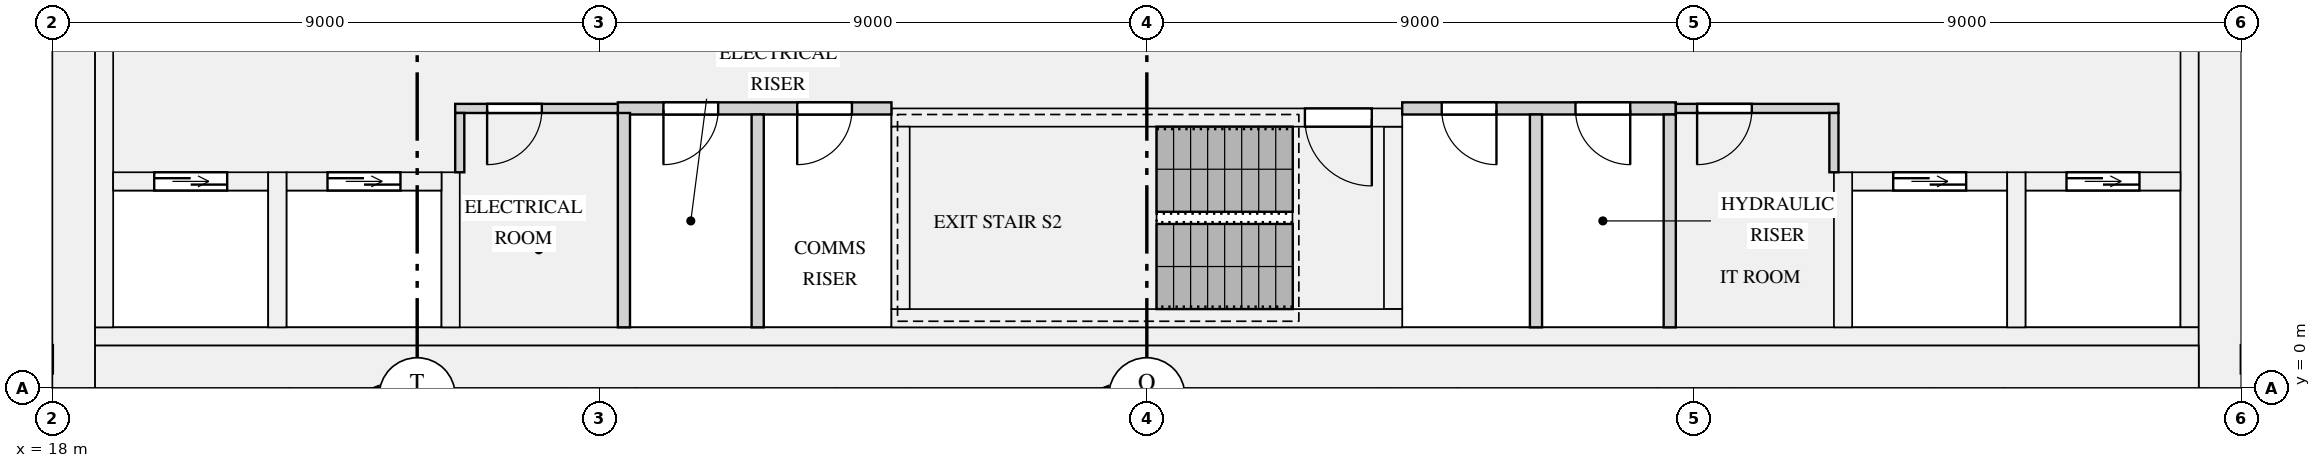
"""IFC4 building model, lengths in metres.
Left out: names, types, materials, properties, quantities, classifications, styles, units other than length and angle.
Written with IfcOpenShell. Run it as: python <this file> out.ifc"""

import sys

from ifc_helpers import new_model, si_unit, direction, frame, frame_2d, origin, place, context, subcontext, project, spatial, rectangle, extrude, element, fill, save


model = new_model("IFC4")
c1 = context("Model", 3, precision=1e-05, world=origin(), true_north=direction((0.0, 1.0)))
c2 = subcontext(c1, "Body", "Model", "MODEL_VIEW")
j1 = project(units=[si_unit("LENGTHUNIT", "METRE"), si_unit("PLANEANGLEUNIT", "RADIAN")], contexts=[c1])
p1 = place(None, origin())
s1 = spatial("IfcSite", under=j1, at=p1, CompositionType="ELEMENT")
p2 = place(p1, origin())
s2 = spatial("IfcBuilding", under=s1, at=p2, CompositionType="ELEMENT")
p3 = place(p2, frame((0.0, 0.0, 182.25)))
s3 = spatial("IfcBuildingStorey", under=s2, at=p3, CompositionType="ELEMENT", Elevation=182.25)
for number, where, z_axis, x_axis in (
    (1, (18.35, 0.0, 0.0), (0.0, 0.0, 1.0), (0.0, 1.0, 0.0)),
    (2, (53.65, 0.0, 0.0), (0.0, 0.0, 1.0), (0.0, 1.0, 0.0)),
):
    element("IfcWall", number, at=place(p3, frame(where, z_axis=z_axis, x_axis=x_axis)), inside=s3, PredefinedType="SHEAR", context=c2, shape_type="SweptSolid", body=[
        extrude(rectangle(XDim=12.5, YDim=0.7, at=frame_2d((6.25, 0.0))), origin(), (0.0, 0.0, 1.0), 3.15),
    ])
p4 = place(p3, frame((18.7, 0.35, 0.0), z_axis=(0.0, 0.0, 1.0), x_axis=(1.0, 0.0, 0.0)))
e3 = element("IfcWall", 3, at=p4, inside=s3, PredefinedType="SHEAR", context=c2, shape_type="SweptSolid", body=[
    extrude(rectangle(XDim=34.6, YDim=0.7, at=frame_2d((17.3, 0.0))), origin(), (0.0, 0.0, 1.0), 3.15),
])
for number, where, z_axis, x_axis in (
    (4, (18.85, 1.0, 0.0), (0.0, 0.0, 1.0), (0.0, 1.0, 0.0)),
    (5, (53.15, 1.0, 0.0), (0.0, 0.0, 1.0), (0.0, 1.0, 0.0)),
):
    element("IfcWall", number, at=place(p3, frame(where, z_axis=z_axis, x_axis=x_axis)), inside=s3, PredefinedType="SHEAR", context=c2, shape_type="SweptSolid", body=[
        extrude(rectangle(XDim=10.9, YDim=0.3, at=frame_2d((5.45, 0.0))), origin(), (0.0, 0.0, 1.0), 3.15),
    ])
p5 = place(p3, frame((18.7, 0.85, 0.0), z_axis=(0.0, 0.0, 1.0), x_axis=(1.0, 0.0, 0.0)))
e6 = element("IfcWall", 6, at=p5, inside=s3, PredefinedType="SHEAR", context=c2, shape_type="SweptSolid", body=[
    extrude(rectangle(XDim=34.6, YDim=0.3, at=frame_2d((17.3, 0.0))), origin(), (0.0, 0.0, 1.0), 3.15),
])
p6 = place(p3, frame((19.0, 3.4, 0.0), z_axis=(0.0, 0.0, 1.0), x_axis=(1.0, 0.0, 0.0)))
e7 = element("IfcWall", 7, at=p6, inside=s3, PredefinedType="SHEAR", context=c2, shape_type="SweptSolid", body=[
    extrude(rectangle(XDim=2.55, YDim=0.3, at=frame_2d((1.275, 0.0))), origin(), (0.0, 0.0, 1.0), 3.15),
])
p7 = place(p6, frame((0.675, 0.0, 0.0)))
e8 = element("IfcOpeningElement", 8, at=p7, cuts=e7, PredefinedType="OPENING", context=c2, shape_type="SweptSolid", body=[
    extrude(rectangle(XDim=1.2, YDim=2.1, at=frame_2d((0.6, 1.05))), frame((0.0, 0.16, 0.0), z_axis=(0.0, -1.0, 0.0), x_axis=(1.0, 0.0, 0.0)), (0.0, 0.0, 1.0), 0.32),
])
p8 = place(p3, frame((21.85, 3.4, 0.0), z_axis=(0.0, 0.0, 1.0), x_axis=(1.0, 0.0, 0.0)))
e9 = element("IfcWall", 9, at=p8, inside=s3, PredefinedType="SHEAR", context=c2, shape_type="SweptSolid", body=[
    extrude(rectangle(XDim=2.55, YDim=0.3, at=frame_2d((1.275, 0.0))), origin(), (0.0, 0.0, 1.0), 3.15),
])
p9 = place(p8, frame((0.675, 0.0, 0.0)))
e10 = element("IfcOpeningElement", 10, at=p9, cuts=e9, PredefinedType="OPENING", context=c2, shape_type="SweptSolid", body=[
    extrude(rectangle(XDim=1.2, YDim=2.1, at=frame_2d((0.6, 1.05))), frame((0.0, 0.16, 0.0), z_axis=(0.0, -1.0, 0.0), x_axis=(1.0, 0.0, 0.0)), (0.0, 0.0, 1.0), 0.32),
])
for number, where, z_axis, x_axis in (
    (11, (21.7, 1.0, 0.0), (0.0, 0.0, 1.0), (0.0, 1.0, 0.0)),
    (12, (24.55, 1.0, 0.0), (0.0, 0.0, 1.0), (0.0, 1.0, 0.0)),
):
    element("IfcWall", number, at=place(p3, frame(where, z_axis=z_axis, x_axis=x_axis)), inside=s3, PredefinedType="SHEAR", context=c2, shape_type="SweptSolid", body=[
        extrude(rectangle(XDim=2.55, YDim=0.3, at=frame_2d((1.275, 0.0))), origin(), (0.0, 0.0, 1.0), 3.15),
    ])
p10 = place(p3, frame((47.6, 3.4, 0.0), z_axis=(0.0, 0.0, 1.0), x_axis=(1.0, 0.0, 0.0)))
e13 = element("IfcWall", 13, at=p10, inside=s3, PredefinedType="SHEAR", context=c2, shape_type="SweptSolid", body=[
    extrude(rectangle(XDim=2.55, YDim=0.3, at=frame_2d((1.275, 0.0))), origin(), (0.0, 0.0, 1.0), 3.15),
])
p11 = place(p10, frame((0.675, 0.0, 0.0)))
e14 = element("IfcOpeningElement", 14, at=p11, cuts=e13, PredefinedType="OPENING", context=c2, shape_type="SweptSolid", body=[
    extrude(rectangle(XDim=1.2, YDim=2.1, at=frame_2d((0.6, 1.05))), frame((0.0, 0.16, 0.0), z_axis=(0.0, -1.0, 0.0), x_axis=(1.0, 0.0, 0.0)), (0.0, 0.0, 1.0), 0.32),
])
p12 = place(p3, frame((47.45, 1.0, 0.0), z_axis=(0.0, 0.0, 1.0), x_axis=(0.0, 1.0, 0.0)))
e15 = element("IfcWall", 15, at=p12, inside=s3, PredefinedType="SHEAR", context=c2, shape_type="SweptSolid", body=[
    extrude(rectangle(XDim=2.55, YDim=0.3, at=frame_2d((1.275, 0.0))), origin(), (0.0, 0.0, 1.0), 3.15),
])
p13 = place(p3, frame((50.45, 3.4, 0.0), z_axis=(0.0, 0.0, 1.0), x_axis=(1.0, 0.0, 0.0)))
e16 = element("IfcWall", 16, at=p13, inside=s3, PredefinedType="SHEAR", context=c2, shape_type="SweptSolid", body=[
    extrude(rectangle(XDim=2.55, YDim=0.3, at=frame_2d((1.275, 0.0))), origin(), (0.0, 0.0, 1.0), 3.15),
])
p14 = place(p13, frame((0.675, 0.0, 0.0)))
e17 = element("IfcOpeningElement", 17, at=p14, cuts=e16, PredefinedType="OPENING", context=c2, shape_type="SweptSolid", body=[
    extrude(rectangle(XDim=1.2, YDim=2.1, at=frame_2d((0.6, 1.05))), frame((0.0, 0.16, 0.0), z_axis=(0.0, -1.0, 0.0), x_axis=(1.0, 0.0, 0.0)), (0.0, 0.0, 1.0), 0.32),
])
p15 = place(p3, frame((50.3, 1.0, 0.0), z_axis=(0.0, 0.0, 1.0), x_axis=(0.0, 1.0, 0.0)))
e18 = element("IfcWall", 18, at=p15, inside=s3, PredefinedType="SHEAR", context=c2, shape_type="SweptSolid", body=[
    extrude(rectangle(XDim=2.55, YDim=0.3, at=frame_2d((1.275, 0.0))), origin(), (0.0, 0.0, 1.0), 3.15),
])
p16 = place(p3, frame((31.8, 1.15, 0.0), z_axis=(0.0, 0.0, 1.0), x_axis=(1.0, 0.0, 0.0)))
e19 = element("IfcWall", 19, at=p16, inside=s3, PredefinedType="SHEAR", context=c2, shape_type="SweptSolid", body=[
    extrude(rectangle(XDim=8.4, YDim=0.3, at=frame_2d((4.2, 0.0))), origin(), (0.0, 0.0, 1.0), 3.15),
])
p17 = place(p3, frame((31.8, 4.45, 0.0), z_axis=(0.0, 0.0, 1.0), x_axis=(1.0, 0.0, 0.0)))
e20 = element("IfcWall", 20, at=p17, inside=s3, PredefinedType="SHEAR", context=c2, shape_type="SweptSolid", body=[
    extrude(rectangle(XDim=8.4, YDim=0.3, at=frame_2d((4.2, 0.0))), origin(), (0.0, 0.0, 1.0), 3.15),
])
p18 = place(p17, frame((6.8, 0.0, 0.0)))
e21 = element("IfcOpeningElement", 21, at=p18, cuts=e20, PredefinedType="OPENING", context=c2, shape_type="SweptSolid", body=[
    extrude(rectangle(XDim=1.1, YDim=2.1, at=frame_2d((0.55, 1.05))), frame((0.0, 0.16, 0.0), z_axis=(0.0, -1.0, 0.0), x_axis=(1.0, 0.0, 0.0)), (0.0, 0.0, 1.0), 0.32),
])
for number, where, z_axis, x_axis in (
    (22, (31.95, 1.3, 0.0), (0.0, 0.0, 1.0), (0.0, 1.0, 0.0)),
    (23, (40.05, 1.3, 0.0), (0.0, 0.0, 1.0), (0.0, 1.0, 0.0)),
):
    element("IfcWall", number, at=place(p3, frame(where, z_axis=z_axis, x_axis=x_axis)), inside=s3, PredefinedType="SHEAR", context=c2, shape_type="SweptSolid", body=[
        extrude(rectangle(XDim=3.0, YDim=0.3, at=frame_2d((1.5, 0.0))), origin(), (0.0, 0.0, 1.0), 3.15),
    ])
p19 = place(p3, frame((27.3, 4.6, 0.0), z_axis=(0.0, 0.0, 1.0), x_axis=(1.0, 0.0, 0.0)))
e24 = element("IfcWall", 24, at=p19, inside=s3, PredefinedType="PARTITIONING", context=c2, shape_type="SweptSolid", body=[
    extrude(rectangle(XDim=4.5, YDim=0.2, at=frame_2d((2.25, 0.0))), origin(), (0.0, 0.0, 1.0), 2.65),
])
p20 = place(p19, frame((0.75, 0.0, 0.0)))
e25 = element("IfcOpeningElement", 25, at=p20, cuts=e24, PredefinedType="OPENING", context=c2, shape_type="SweptSolid", body=[
    extrude(rectangle(XDim=0.9, YDim=2.1, at=frame_2d((0.45, 1.05))), frame((0.0, 0.11, 0.0), z_axis=(0.0, -1.0, 0.0), x_axis=(1.0, 0.0, 0.0)), (0.0, 0.0, 1.0), 0.22),
])
p21 = place(p19, frame((2.95, 0.0, 0.0)))
e26 = element("IfcOpeningElement", 26, at=p21, cuts=e24, PredefinedType="OPENING", context=c2, shape_type="SweptSolid", body=[
    extrude(rectangle(XDim=0.9, YDim=2.1, at=frame_2d((0.45, 1.05))), frame((0.0, 0.11, 0.0), z_axis=(0.0, -1.0, 0.0), x_axis=(1.0, 0.0, 0.0)), (0.0, 0.0, 1.0), 0.22),
])
p22 = place(p3, frame((40.2, 4.6, 0.0), z_axis=(0.0, 0.0, 1.0), x_axis=(1.0, 0.0, 0.0)))
e27 = element("IfcWall", 27, at=p22, inside=s3, PredefinedType="PARTITIONING", context=c2, shape_type="SweptSolid", body=[
    extrude(rectangle(XDim=4.5, YDim=0.2, at=frame_2d((2.25, 0.0))), origin(), (0.0, 0.0, 1.0), 2.65),
])
p23 = place(p22, frame((0.65, 0.0, 0.0)))
e28 = element("IfcOpeningElement", 28, at=p23, cuts=e27, PredefinedType="OPENING", context=c2, shape_type="SweptSolid", body=[
    extrude(rectangle(XDim=0.9, YDim=2.1, at=frame_2d((0.45, 1.05))), frame((0.0, 0.11, 0.0), z_axis=(0.0, -1.0, 0.0), x_axis=(1.0, 0.0, 0.0)), (0.0, 0.0, 1.0), 0.22),
])
p24 = place(p22, frame((2.85, 0.0, 0.0)))
e29 = element("IfcOpeningElement", 29, at=p24, cuts=e27, PredefinedType="OPENING", context=c2, shape_type="SweptSolid", body=[
    extrude(rectangle(XDim=0.9, YDim=2.1, at=frame_2d((0.45, 1.05))), frame((0.0, 0.11, 0.0), z_axis=(0.0, -1.0, 0.0), x_axis=(1.0, 0.0, 0.0)), (0.0, 0.0, 1.0), 0.22),
])
p25 = place(p3, frame((24.625, 4.6, 0.0), z_axis=(0.0, 0.0, 1.0), x_axis=(1.0, 0.0, 0.0)))
e30 = element("IfcWall", 30, at=p25, inside=s3, PredefinedType="PARTITIONING", context=c2, shape_type="SweptSolid", body=[
    extrude(rectangle(XDim=2.675, YDim=0.15, at=frame_2d((1.337, 0.0))), origin(), (0.0, 0.0, 1.0), 2.65),
])
p26 = place(p25, frame((0.525, 0.0, 0.0)))
e31 = element("IfcOpeningElement", 31, at=p26, cuts=e30, PredefinedType="OPENING", context=c2, shape_type="SweptSolid", body=[
    extrude(rectangle(XDim=0.9, YDim=2.1, at=frame_2d((0.45, 1.05))), frame((0.0, 0.085, 0.0), z_axis=(0.0, -1.0, 0.0), x_axis=(1.0, 0.0, 0.0)), (0.0, 0.0, 1.0), 0.17),
])
p27 = place(p3, frame((44.7, 4.6, 0.0), z_axis=(0.0, 0.0, 1.0), x_axis=(1.0, 0.0, 0.0)))
e32 = element("IfcWall", 32, at=p27, inside=s3, PredefinedType="PARTITIONING", context=c2, shape_type="SweptSolid", body=[
    extrude(rectangle(XDim=2.675, YDim=0.15, at=frame_2d((1.337, 0.0))), origin(), (0.0, 0.0, 1.0), 2.65),
])
p28 = place(p27, frame((0.35, 0.0, 0.0)))
e33 = element("IfcOpeningElement", 33, at=p28, cuts=e32, PredefinedType="OPENING", context=c2, shape_type="SweptSolid", body=[
    extrude(rectangle(XDim=0.9, YDim=2.1, at=frame_2d((0.45, 1.05))), frame((0.0, 0.085, 0.0), z_axis=(0.0, -1.0, 0.0), x_axis=(1.0, 0.0, 0.0)), (0.0, 0.0, 1.0), 0.17),
])
p29 = place(p3, frame((27.4, 1.0, 0.0), z_axis=(0.0, 0.0, 1.0), x_axis=(0.0, 1.0, 0.0)))
e34 = element("IfcWall", 34, at=p29, inside=s3, PredefinedType="PARTITIONING", context=c2, shape_type="SweptSolid", body=[
    extrude(rectangle(XDim=3.525, YDim=0.2, at=frame_2d((1.762, 0.0))), origin(), (0.0, 0.0, 1.0), 2.65),
])
for number, where, z_axis, x_axis in (
    (35, (29.6, 1.0, 0.0), (0.0, 0.0, 1.0), (0.0, 1.0, 0.0)),
    (36, (42.4, 1.0, 0.0), (0.0, 0.0, 1.0), (0.0, 1.0, 0.0)),
    (37, (44.6, 1.0, 0.0), (0.0, 0.0, 1.0), (0.0, 1.0, 0.0)),
):
    element("IfcWall", number, at=place(p3, frame(where, z_axis=z_axis, x_axis=x_axis)), inside=s3, PredefinedType="PARTITIONING", context=c2, shape_type="SweptSolid", body=[
        extrude(rectangle(XDim=3.5, YDim=0.2, at=frame_2d((1.75, 0.0))), origin(), (0.0, 0.0, 1.0), 2.65),
    ])
for number, where, z_axis, x_axis in (
    (38, (24.7, 3.55, 0.0), (0.0, 0.0, 1.0), (0.0, 1.0, 0.0)),
    (39, (47.3, 3.55, 0.0), (0.0, 0.0, 1.0), (0.0, 1.0, 0.0)),
):
    element("IfcWall", number, at=place(p3, frame(where, z_axis=z_axis, x_axis=x_axis)), inside=s3, PredefinedType="PARTITIONING", context=c2, shape_type="SweptSolid", body=[
        extrude(rectangle(XDim=0.975, YDim=0.15, at=frame_2d((0.487, 0.0))), origin(), (0.0, 0.0, 1.0), 2.65),
    ])
p30 = place(p7, origin())
e40 = element("IfcDoor", 40, at=p30, inside=s3, OperationType="DOUBLE_DOOR_SLIDING", PredefinedType="DOOR", context=c2, shape_type="SweptSolid", body=[
    extrude(rectangle(XDim=1.2, YDim=2.1, at=frame_2d((0.6, 1.05))), frame((0.0, 0.025, 0.0), z_axis=(0.0, -1.0, 0.0), x_axis=(1.0, 0.0, 0.0)), (0.0, 0.0, 1.0), 0.05),
])
fill(e8, e40)
p31 = place(p9, origin())
e41 = element("IfcDoor", 41, at=p31, inside=s3, OperationType="DOUBLE_DOOR_SLIDING", PredefinedType="DOOR", context=c2, shape_type="SweptSolid", body=[
    extrude(rectangle(XDim=1.2, YDim=2.1, at=frame_2d((0.6, 1.05))), frame((0.0, 0.025, 0.0), z_axis=(0.0, -1.0, 0.0), x_axis=(1.0, 0.0, 0.0)), (0.0, 0.0, 1.0), 0.05),
])
fill(e10, e41)
p32 = place(p11, origin())
e42 = element("IfcDoor", 42, at=p32, inside=s3, OperationType="DOUBLE_DOOR_SLIDING", PredefinedType="DOOR", context=c2, shape_type="SweptSolid", body=[
    extrude(rectangle(XDim=1.2, YDim=2.1, at=frame_2d((0.6, 1.05))), frame((0.0, 0.025, 0.0), z_axis=(0.0, -1.0, 0.0), x_axis=(1.0, 0.0, 0.0)), (0.0, 0.0, 1.0), 0.05),
])
fill(e14, e42)
p33 = place(p14, origin())
e43 = element("IfcDoor", 43, at=p33, inside=s3, OperationType="DOUBLE_DOOR_SLIDING", PredefinedType="DOOR", context=c2, shape_type="SweptSolid", body=[
    extrude(rectangle(XDim=1.2, YDim=2.1, at=frame_2d((0.6, 1.05))), frame((0.0, 0.025, 0.0), z_axis=(0.0, -1.0, 0.0), x_axis=(1.0, 0.0, 0.0)), (0.0, 0.0, 1.0), 0.05),
])
fill(e17, e43)
p34 = place(p18, frame((1.1, 0.0, 0.0), z_axis=(0.0, 0.0, 1.0), x_axis=(-1.0, 0.0, 0.0)))
e44 = element("IfcDoor", 44, at=p34, inside=s3, OperationType="SINGLE_SWING_LEFT", PredefinedType="DOOR", context=c2, shape_type="SweptSolid", body=[
    extrude(rectangle(XDim=1.1, YDim=2.1, at=frame_2d((0.55, 1.05))), frame((0.0, 0.025, 0.0), z_axis=(0.0, -1.0, 0.0), x_axis=(1.0, 0.0, 0.0)), (0.0, 0.0, 1.0), 0.05),
])
fill(e21, e44)
p35 = place(p26, frame((0.9, 0.0, 0.0), z_axis=(0.0, 0.0, 1.0), x_axis=(-1.0, 0.0, 0.0)))
e45 = element("IfcDoor", 45, at=p35, inside=s3, OperationType="SINGLE_SWING_RIGHT", PredefinedType="DOOR", context=c2, shape_type="SweptSolid", body=[
    extrude(rectangle(XDim=0.9, YDim=2.1, at=frame_2d((0.45, 1.05))), frame((0.0, 0.025, 0.0), z_axis=(0.0, -1.0, 0.0), x_axis=(1.0, 0.0, 0.0)), (0.0, 0.0, 1.0), 0.05),
])
fill(e31, e45)
p36 = place(p28, frame((0.9, 0.0, 0.0), z_axis=(0.0, 0.0, 1.0), x_axis=(-1.0, 0.0, 0.0)))
e46 = element("IfcDoor", 46, at=p36, inside=s3, OperationType="SINGLE_SWING_RIGHT", PredefinedType="DOOR", context=c2, shape_type="SweptSolid", body=[
    extrude(rectangle(XDim=0.9, YDim=2.1, at=frame_2d((0.45, 1.05))), frame((0.0, 0.025, 0.0), z_axis=(0.0, -1.0, 0.0), x_axis=(1.0, 0.0, 0.0)), (0.0, 0.0, 1.0), 0.05),
])
fill(e33, e46)
p37 = place(p20, frame((0.9, 0.0, 0.0), z_axis=(0.0, 0.0, 1.0), x_axis=(-1.0, 0.0, 0.0)))
e47 = element("IfcDoor", 47, at=p37, inside=s3, OperationType="SINGLE_SWING_RIGHT", PredefinedType="DOOR", context=c2, shape_type="SweptSolid", body=[
    extrude(rectangle(XDim=0.9, YDim=2.1, at=frame_2d((0.45, 1.05))), frame((0.0, 0.025, 0.0), z_axis=(0.0, -1.0, 0.0), x_axis=(1.0, 0.0, 0.0)), (0.0, 0.0, 1.0), 0.05),
])
fill(e25, e47)
p38 = place(p21, frame((0.9, 0.0, 0.0), z_axis=(0.0, 0.0, 1.0), x_axis=(-1.0, 0.0, 0.0)))
e48 = element("IfcDoor", 48, at=p38, inside=s3, OperationType="SINGLE_SWING_RIGHT", PredefinedType="DOOR", context=c2, shape_type="SweptSolid", body=[
    extrude(rectangle(XDim=0.9, YDim=2.1, at=frame_2d((0.45, 1.05))), frame((0.0, 0.025, 0.0), z_axis=(0.0, -1.0, 0.0), x_axis=(1.0, 0.0, 0.0)), (0.0, 0.0, 1.0), 0.05),
])
fill(e26, e48)
p39 = place(p23, frame((0.9, 0.0, 0.0), z_axis=(0.0, 0.0, 1.0), x_axis=(-1.0, 0.0, 0.0)))
e49 = element("IfcDoor", 49, at=p39, inside=s3, OperationType="SINGLE_SWING_LEFT", PredefinedType="DOOR", context=c2, shape_type="SweptSolid", body=[
    extrude(rectangle(XDim=0.9, YDim=2.1, at=frame_2d((0.45, 1.05))), frame((0.0, 0.025, 0.0), z_axis=(0.0, -1.0, 0.0), x_axis=(1.0, 0.0, 0.0)), (0.0, 0.0, 1.0), 0.05),
])
fill(e28, e49)
p40 = place(p24, frame((0.9, 0.0, 0.0), z_axis=(0.0, 0.0, 1.0), x_axis=(-1.0, 0.0, 0.0)))
e50 = element("IfcDoor", 50, at=p40, inside=s3, OperationType="SINGLE_SWING_LEFT", PredefinedType="DOOR", context=c2, shape_type="SweptSolid", body=[
    extrude(rectangle(XDim=0.9, YDim=2.1, at=frame_2d((0.45, 1.05))), frame((0.0, 0.025, 0.0), z_axis=(0.0, -1.0, 0.0), x_axis=(1.0, 0.0, 0.0)), (0.0, 0.0, 1.0), 0.05),
])
fill(e29, e50)
save(model, sys.argv[1])
